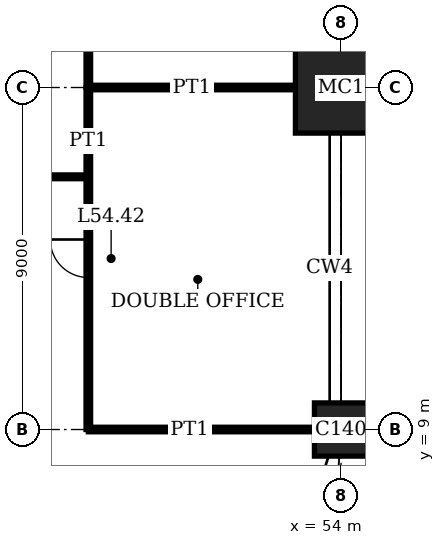
"""IFC4 building model, lengths in metres.
Left out: names, types, materials, properties, quantities, classifications, styles, units other than length and angle.
Written with IfcOpenShell. Run it as: python <this file> out.ifc"""

import sys

from ifc_helpers import new_model, si_unit, direction, frame, frame_2d, origin, origin_2d, place, context, subcontext, project, spatial, rectangle, extrude, element, fill, save


model = new_model("IFC4")
c1 = context("Model", 3, precision=1e-05, world=origin(), true_north=direction((0.0, 1.0)))
c2 = subcontext(c1, "Body", "Model", "MODEL_VIEW")
j1 = project(units=[si_unit("LENGTHUNIT", "METRE"), si_unit("PLANEANGLEUNIT", "RADIAN")], contexts=[c1])
p1 = place(None, origin())
s1 = spatial("IfcSite", under=j1, at=p1, CompositionType="ELEMENT")
p2 = place(p1, origin())
s2 = spatial("IfcBuilding", under=s1, at=p2, CompositionType="ELEMENT")
p3 = place(p2, frame((0.0, 0.0, 222.2)))
s3 = spatial("IfcBuildingStorey", under=s2, at=p3, CompositionType="ELEMENT", Elevation=222.2)
p4 = place(p3, frame((54.0, 9.0, 0.0), z_axis=(0.0, 0.0, 1.0), x_axis=(1.0, 0.0, 0.0)))
e1 = element("IfcColumn", 1, at=p4, inside=s3, PredefinedType="COLUMN", context=c2, shape_type="SweptSolid", body=[
    extrude(rectangle(XDim=1.4, YDim=1.4, at=origin_2d()), origin(), (0.0, 0.0, 1.0), 4.0),
])
p5 = place(p3, frame((54.0, 18.0, 0.0), z_axis=(0.0, 0.0, 1.0), x_axis=(1.0, 0.0, 0.0)))
e2 = element("IfcColumn", 2, at=p5, inside=s3, PredefinedType="COLUMN", context=c2, shape_type="SweptSolid", body=[
    extrude(rectangle(XDim=2.4, YDim=2.4, at=origin_2d()), origin(), (0.0, 0.0, 1.0), 4.0),
])
p6 = place(p3, frame((47.35, 9.0, 0.0), z_axis=(0.0, 0.0, 1.0), x_axis=(1.0, 0.0, 0.0)))
e3 = element("IfcWall", 3, at=p6, inside=s3, PredefinedType="PARTITIONING", context=c2, shape_type="SweptSolid", body=[
    extrude(rectangle(XDim=5.95, YDim=0.12, at=frame_2d((2.975, 0.0))), origin(), (0.0, 0.0, 1.0), 3.05),
])
p7 = place(p3, frame((40.5, 15.65, 0.0), z_axis=(0.0, 0.0, 1.0), x_axis=(1.0, 0.0, 0.0)))
e4 = element("IfcWall", 4, at=p7, inside=s3, PredefinedType="PARTITIONING", context=c2, shape_type="SweptSolid", body=[
    extrude(rectangle(XDim=6.85, YDim=0.1, at=frame_2d((3.425, 0.0))), origin(), (0.0, 0.0, 1.0), 3.75),
])
p8 = place(p3, frame((47.35, 18.0, 0.0), z_axis=(0.0, 0.0, 1.0), x_axis=(1.0, 0.0, 0.0)))
e5 = element("IfcWall", 5, at=p8, inside=s3, PredefinedType="PARTITIONING", context=c2, shape_type="SweptSolid", body=[
    extrude(rectangle(XDim=5.45, YDim=0.12, at=frame_2d((2.725, 0.0))), origin(), (0.0, 0.0, 1.0), 3.05),
])
p9 = place(p3, frame((47.35, 9.0, 0.0), z_axis=(0.0, 0.0, 1.0), x_axis=(0.0, 1.0, 0.0)))
e6 = element("IfcWall", 6, at=p9, inside=s3, PredefinedType="PARTITIONING", context=c2, shape_type="SweptSolid", body=[
    extrude(rectangle(XDim=9.0, YDim=0.12, at=frame_2d((4.5, 0.0))), origin(), (0.0, 0.0, 1.0), 3.75),
])
p10 = place(p9, frame((4.0, 0.0, 0.0)))
e7 = element("IfcOpeningElement", 7, at=p10, cuts=e6, PredefinedType="OPENING", context=c2, shape_type="SweptSolid", body=[
    extrude(rectangle(XDim=1.0, YDim=2.4, at=frame_2d((0.5, 1.2))), frame((0.0, 0.07, 0.0), z_axis=(0.0, -1.0, 0.0), x_axis=(1.0, 0.0, 0.0)), (0.0, 0.0, 1.0), 0.14),
])
p11 = place(p3, frame((47.35, 18.0, 0.0), z_axis=(0.0, 0.0, 1.0), x_axis=(0.0, 1.0, 0.0)))
e8 = element("IfcWall", 8, at=p11, inside=s3, PredefinedType="PARTITIONING", context=c2, shape_type="SweptSolid", body=[
    extrude(rectangle(XDim=9.0, YDim=0.12, at=frame_2d((4.5, 0.0))), origin(), (0.0, 0.0, 1.0), 3.75),
])
p12 = place(p11, frame((4.0, 0.0, 0.0)))
e9 = element("IfcOpeningElement", 9, at=p12, cuts=e8, PredefinedType="OPENING", context=c2, shape_type="SweptSolid", body=[
    extrude(rectangle(XDim=1.0, YDim=2.4, at=frame_2d((0.5, 1.2))), frame((0.0, 0.07, 0.0), z_axis=(0.0, -1.0, 0.0), x_axis=(1.0, 0.0, 0.0)), (0.0, 0.0, 1.0), 0.14),
])
p13 = place(p10, origin())
e10 = element("IfcDoor", 10, at=p13, inside=s3, OperationType="SINGLE_SWING_LEFT", PredefinedType="DOOR", context=c2, shape_type="SweptSolid", body=[
    extrude(rectangle(XDim=1.0, YDim=2.4, at=frame_2d((0.5, 1.2))), frame((0.0, 0.025, 0.0), z_axis=(0.0, -1.0, 0.0), x_axis=(1.0, 0.0, 0.0)), (0.0, 0.0, 1.0), 0.05),
])
fill(e7, e10)
save(model, sys.argv[1])
